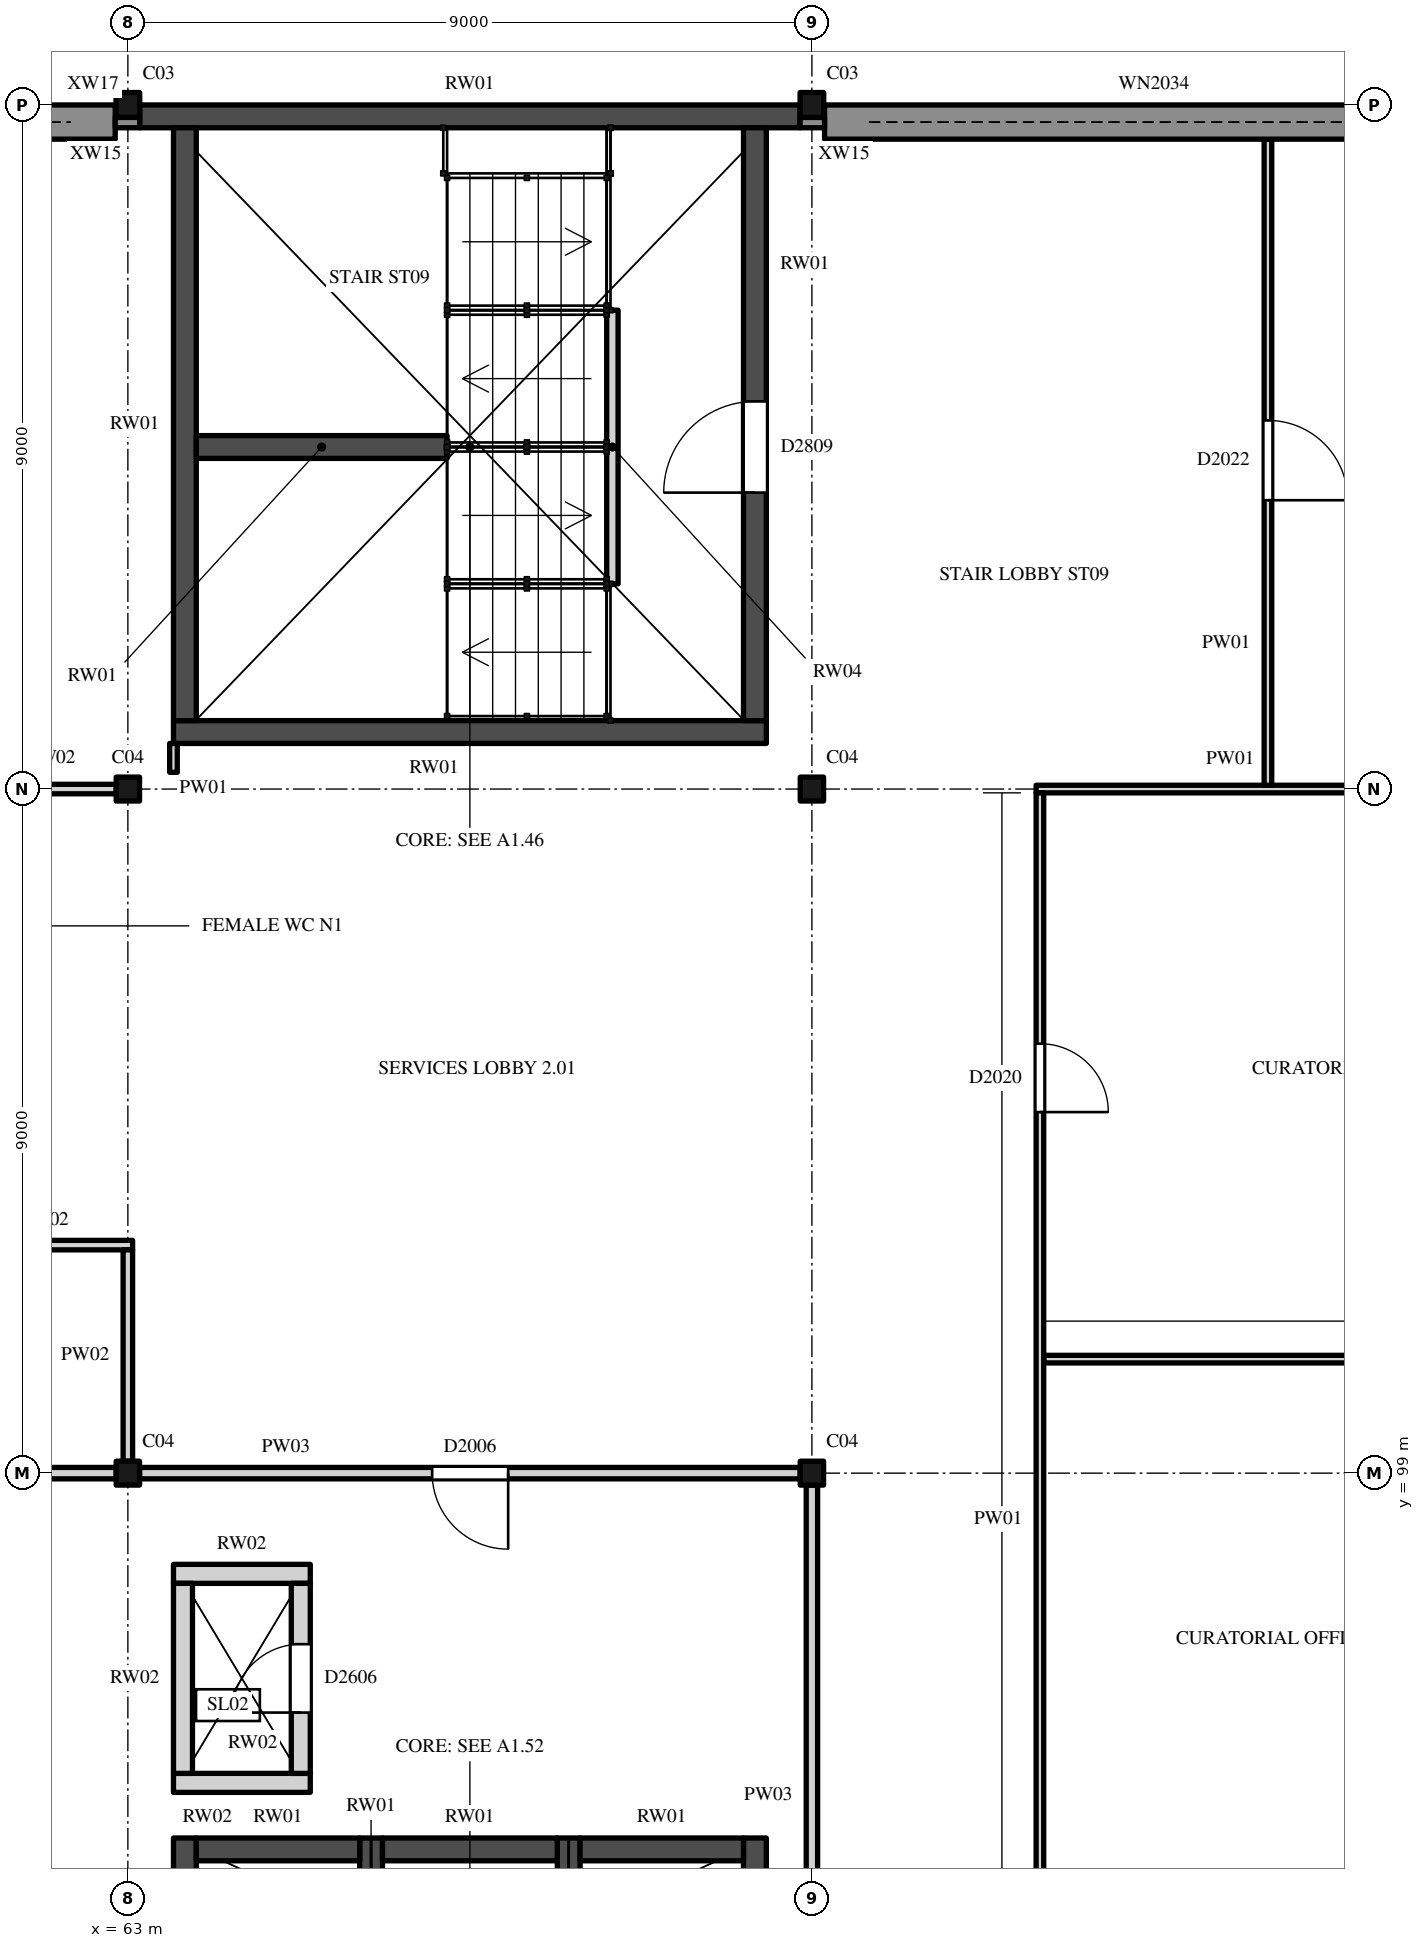
"""IFC4 building model, lengths in metres.
Left out: names, types, materials, properties, quantities, classifications, styles, units other than length and angle.
Written with IfcOpenShell. Run it as: python <this file> out.ifc"""

import sys

from ifc_helpers import new_model, si_unit, direction, frame, frame_2d, origin, origin_2d, place, context, subcontext, project, spatial, rectangle, i_section, extrude, element, fill, save


model = new_model("IFC4")
c1 = context("Model", 3, precision=1e-05, world=origin(), true_north=direction((0.0, 1.0)))
c2 = subcontext(c1, "Body", "Model", "MODEL_VIEW")
j1 = project(units=[si_unit("LENGTHUNIT", "METRE"), si_unit("PLANEANGLEUNIT", "RADIAN")], contexts=[c1])
p1 = place(None, origin())
s1 = spatial("IfcSite", under=j1, at=p1, CompositionType="ELEMENT")
p2 = place(p1, origin())
s2 = spatial("IfcBuilding", under=s1, at=p2, CompositionType="ELEMENT")
p3 = place(p2, frame((0.0, 0.0, 11.0)))
s3 = spatial("IfcBuildingStorey", under=s2, at=p3, CompositionType="ELEMENT", Elevation=11.0)
for number, where, z_axis, x_axis in (
    (1, (63.0, 99.0, 0.0), (0.0, 0.0, 1.0), (1.0, 0.0, 0.0)),
    (2, (72.0, 99.0, 0.0), (0.0, 0.0, 1.0), (1.0, 0.0, 0.0)),
    (3, (63.0, 108.0, 0.0), (0.0, 0.0, 1.0), (1.0, 0.0, 0.0)),
    (4, (72.0, 108.0, 0.0), (0.0, 0.0, 1.0), (1.0, 0.0, 0.0)),
):
    element("IfcColumn", number, at=place(p3, frame(where, z_axis=z_axis, x_axis=x_axis)), inside=s3, PredefinedType="COLUMN", context=c2, shape_type="SweptSolid", body=[
        extrude(i_section(OverallWidth=0.307, OverallDepth=0.315, WebThickness=0.012, FlangeThickness=0.019, FilletRadius=0.017, at=origin_2d()), origin(), (0.0, 0.0, 1.0), 5.0),
    ])
for number, where, z_axis, x_axis in (
    (5, (63.0, 117.0, 0.0), (0.0, 0.0, 1.0), (1.0, 0.0, 0.0)),
    (6, (72.0, 117.0, 0.0), (0.0, 0.0, 1.0), (1.0, 0.0, 0.0)),
):
    element("IfcColumn", number, at=place(p3, frame(where, z_axis=z_axis, x_axis=x_axis)), inside=s3, PredefinedType="COLUMN", context=c2, shape_type="SweptSolid", body=[
        extrude(i_section(OverallWidth=0.311, OverallDepth=0.327, WebThickness=0.016, FlangeThickness=0.025, FilletRadius=0.017, at=origin_2d()), origin(), (0.0, 0.0, 1.0), 5.0),
    ])
p4 = place(p3, frame((63.6, 108.75, 0.0), z_axis=(0.0, 0.0, 1.0), x_axis=(1.0, 0.0, 0.0)))
e7 = element("IfcWall", 7, at=p4, inside=s3, PredefinedType="SHEAR", context=c2, shape_type="SweptSolid", body=[
    extrude(rectangle(XDim=7.8, YDim=0.3, at=frame_2d((3.9, 0.0))), origin(), (0.0, 0.0, 1.0), 5.0),
])
p5 = place(p3, frame((63.156, 116.85, 0.0), z_axis=(0.0, 0.0, 1.0), x_axis=(1.0, 0.0, 0.0)))
e8 = element("IfcWall", 8, at=p5, inside=s3, PredefinedType="SHEAR", context=c2, shape_type="SweptSolid", body=[
    extrude(rectangle(XDim=8.689, YDim=0.3, at=frame_2d((4.344, 0.0))), origin(), (0.0, 0.0, 1.0), 5.0),
])
p6 = place(p3, frame((63.75, 108.9, 0.0), z_axis=(0.0, 0.0, 1.0), x_axis=(0.0, 1.0, 0.0)))
e9 = element("IfcWall", 9, at=p6, inside=s3, PredefinedType="SHEAR", context=c2, shape_type="SweptSolid", body=[
    extrude(rectangle(XDim=7.8, YDim=0.3, at=frame_2d((3.9, 0.0))), origin(), (0.0, 0.0, 1.0), 5.0),
])
p7 = place(p3, frame((71.25, 108.9, 0.0), z_axis=(0.0, 0.0, 1.0), x_axis=(0.0, 1.0, 0.0)))
e10 = element("IfcWall", 10, at=p7, inside=s3, PredefinedType="SHEAR", context=c2, shape_type="SweptSolid", body=[
    extrude(rectangle(XDim=7.8, YDim=0.3, at=frame_2d((3.9, 0.0))), origin(), (0.0, 0.0, 1.0), 5.0),
])
p8 = place(p7, frame((3.0, 0.0, 0.0)))
e11 = element("IfcOpeningElement", 11, at=p8, cuts=e10, PredefinedType="OPENING", context=c2, shape_type="SweptSolid", body=[
    extrude(rectangle(XDim=1.2, YDim=2.1, at=frame_2d((0.6, 1.05))), frame((0.0, 0.16, 0.0), z_axis=(0.0, -1.0, 0.0), x_axis=(1.0, 0.0, 0.0)), (0.0, 0.0, 1.0), 0.32),
])
p9 = place(p3, frame((67.2, 112.5, 0.0), z_axis=(0.0, 0.0, 1.0), x_axis=(-1.0, 0.0, 0.0)))
e12 = element("IfcWall", 12, at=p9, inside=s3, PredefinedType="SHEAR", context=c2, shape_type="SweptSolid", body=[
    extrude(rectangle(XDim=3.3, YDim=0.3, at=frame_2d((1.65, 0.0))), origin(), (0.0, 0.0, 1.0), 5.0),
])
p10 = place(p3, frame((69.375, 110.7, 0.0), z_axis=(0.0, 0.0, 1.0), x_axis=(0.0, 1.0, 0.0)))
e13 = element("IfcWall", 13, at=p10, inside=s3, PredefinedType="STANDARD", context=c2, shape_type="SweptSolid", body=[
    extrude(rectangle(XDim=3.6, YDim=0.15, at=frame_2d((1.8, 0.0))), origin(), (0.0, 0.0, 1.0), 2.3),
])
for number, where, z_axis, x_axis in (
    (14, (63.75, 90.6, 0.0), (0.0, 0.0, 1.0), (0.0, 1.0, 0.0)),
    (15, (66.2, 90.6, 0.0), (0.0, 0.0, 1.0), (0.0, 1.0, 0.0)),
    (16, (68.8, 90.6, 0.0), (0.0, 0.0, 1.0), (0.0, 1.0, 0.0)),
    (17, (71.25, 90.6, 0.0), (0.0, 0.0, 1.0), (0.0, 1.0, 0.0)),
):
    element("IfcWall", number, at=place(p3, frame(where, z_axis=z_axis, x_axis=x_axis)), inside=s3, PredefinedType="SHEAR", context=c2, shape_type="SweptSolid", body=[
        extrude(rectangle(XDim=3.6, YDim=0.3, at=frame_2d((1.8, 0.0))), origin(), (0.0, 0.0, 1.0), 5.0),
    ])
p11 = place(p3, frame((63.9, 94.05, 0.0), z_axis=(0.0, 0.0, 1.0), x_axis=(1.0, 0.0, 0.0)))
e18 = element("IfcWall", 18, at=p11, inside=s3, PredefinedType="SHEAR", context=c2, shape_type="SweptSolid", body=[
    extrude(rectangle(XDim=2.15, YDim=0.3, at=frame_2d((1.075, 0.0))), origin(), (0.0, 0.0, 1.0), 5.0),
])
p12 = place(p3, frame((66.35, 94.05, 0.0), z_axis=(0.0, 0.0, 1.0), x_axis=(1.0, 0.0, 0.0)))
e19 = element("IfcWall", 19, at=p12, inside=s3, PredefinedType="SHEAR", context=c2, shape_type="SweptSolid", body=[
    extrude(rectangle(XDim=2.3, YDim=0.3, at=frame_2d((1.15, 0.0))), origin(), (0.0, 0.0, 1.0), 5.0),
])
p13 = place(p3, frame((68.95, 94.05, 0.0), z_axis=(0.0, 0.0, 1.0), x_axis=(1.0, 0.0, 0.0)))
e20 = element("IfcWall", 20, at=p13, inside=s3, PredefinedType="SHEAR", context=c2, shape_type="SweptSolid", body=[
    extrude(rectangle(XDim=2.15, YDim=0.3, at=frame_2d((1.075, 0.0))), origin(), (0.0, 0.0, 1.0), 5.0),
])
for number, where, z_axis, x_axis in (
    (21, (63.6, 94.925, 0.0), (0.0, 0.0, 1.0), (1.0, 0.0, 0.0)),
    (22, (63.6, 97.675, 0.0), (0.0, 0.0, 1.0), (1.0, 0.0, 0.0)),
):
    element("IfcWall", number, at=place(p3, frame(where, z_axis=z_axis, x_axis=x_axis)), inside=s3, PredefinedType="STANDARD", context=c2, shape_type="SweptSolid", body=[
        extrude(rectangle(XDim=1.8, YDim=0.25, at=frame_2d((0.9, 0.0))), origin(), (0.0, 0.0, 1.0), 5.0),
    ])
p14 = place(p3, frame((63.725, 95.05, 0.0), z_axis=(0.0, 0.0, 1.0), x_axis=(0.0, 1.0, 0.0)))
e23 = element("IfcWall", 23, at=p14, inside=s3, PredefinedType="STANDARD", context=c2, shape_type="SweptSolid", body=[
    extrude(rectangle(XDim=2.5, YDim=0.25, at=frame_2d((1.25, 0.0))), origin(), (0.0, 0.0, 1.0), 5.0),
])
p15 = place(p3, frame((65.275, 95.05, 0.0), z_axis=(0.0, 0.0, 1.0), x_axis=(0.0, 1.0, 0.0)))
e24 = element("IfcWall", 24, at=p15, inside=s3, PredefinedType="STANDARD", context=c2, shape_type="SweptSolid", body=[
    extrude(rectangle(XDim=2.5, YDim=0.25, at=frame_2d((1.25, 0.0))), origin(), (0.0, 0.0, 1.0), 5.0),
])
p16 = place(p15, frame((0.8, 0.0, 0.0)))
e25 = element("IfcOpeningElement", 25, at=p16, cuts=e24, PredefinedType="OPENING", context=c2, shape_type="SweptSolid", body=[
    extrude(rectangle(XDim=0.9, YDim=2.1, at=frame_2d((0.45, 1.05))), frame((0.0, 0.135, 0.0), z_axis=(0.0, -1.0, 0.0), x_axis=(1.0, 0.0, 0.0)), (0.0, 0.0, 1.0), 0.27),
])
p17 = place(p3, frame((54.156, 116.775, 0.0), z_axis=(0.0, 0.0, 1.0), x_axis=(1.0, 0.0, 0.0)))
e26 = element("IfcWall", 26, at=p17, inside=s3, PredefinedType="SOLIDWALL", context=c2, shape_type="SweptSolid", body=[
    extrude(rectangle(XDim=8.678, YDim=0.45, at=frame_2d((4.339, 0.0))), origin(), (0.0, 0.0, 1.0), 4.469),
])
p18 = place(p17, frame((0.594, 0.0, 1.6)))
e27 = element("IfcOpeningElement", 27, at=p18, cuts=e26, PredefinedType="OPENING", context=c2, shape_type="SweptSolid", body=[
    extrude(rectangle(XDim=7.5, YDim=1.2, at=frame_2d((3.75, 0.6))), frame((0.0, 0.235, 0.0), z_axis=(0.0, -1.0, 0.0), x_axis=(1.0, 0.0, 0.0)), (0.0, 0.0, 1.0), 0.47),
])
p19 = place(p3, frame((72.167, 116.775, 0.0), z_axis=(0.0, 0.0, 1.0), x_axis=(1.0, 0.0, 0.0)))
e28 = element("IfcWall", 28, at=p19, inside=s3, PredefinedType="SOLIDWALL", context=c2, shape_type="SweptSolid", body=[
    extrude(rectangle(XDim=8.673, YDim=0.45, at=frame_2d((4.336, 0.0))), origin(), (0.0, 0.0, 1.0), 4.469),
])
p20 = place(p19, frame((0.583, 0.0, 1.6)))
e29 = element("IfcOpeningElement", 29, at=p20, cuts=e28, PredefinedType="OPENING", context=c2, shape_type="SweptSolid", body=[
    extrude(rectangle(XDim=7.5, YDim=1.2, at=frame_2d((3.75, 0.6))), frame((0.0, 0.235, 0.0), z_axis=(0.0, -1.0, 0.0), x_axis=(1.0, 0.0, 0.0)), (0.0, 0.0, 1.0), 0.47),
])
for number, where, z_axis, x_axis in (
    (30, (62.833, 116.768, 0.0), (0.0, 0.0, 1.0), (1.0, 0.0, 0.0)),
    (31, (71.844, 116.768, 0.0), (0.0, 0.0, 1.0), (1.0, 0.0, 0.0)),
):
    element("IfcWall", number, at=place(p3, frame(where, z_axis=z_axis, x_axis=x_axis)), inside=s3, PredefinedType="SOLIDWALL", context=c2, shape_type="SweptSolid", body=[
        extrude(rectangle(XDim=0.322, YDim=0.136, at=frame_2d((0.161, 0.0))), origin(), (0.0, 0.0, 1.0), 5.0),
    ])
p21 = place(p3, frame((54.45, 99.0, 0.0), z_axis=(0.0, 0.0, 1.0), x_axis=(1.0, 0.0, 0.0)))
e32 = element("IfcWall", 32, at=p21, inside=s3, PredefinedType="PARTITIONING", context=c2, shape_type="SweptSolid", body=[
    extrude(rectangle(XDim=8.396, YDim=0.15, at=frame_2d((4.198, 0.0))), origin(), (0.0, 0.0, 1.0), 4.469),
])
p22 = place(p3, frame((63.154, 99.0, 0.0), z_axis=(0.0, 0.0, 1.0), x_axis=(1.0, 0.0, 0.0)))
e33 = element("IfcWall", 33, at=p22, inside=s3, PredefinedType="PARTITIONING", context=c2, shape_type="SweptSolid", body=[
    extrude(rectangle(XDim=8.693, YDim=0.15, at=frame_2d((4.346, 0.0))), origin(), (0.0, 0.0, 1.0), 4.469),
])
p23 = place(p22, frame((3.85, 0.0, 0.0)))
e34 = element("IfcOpeningElement", 34, at=p23, cuts=e33, PredefinedType="OPENING", context=c2, shape_type="SweptSolid", body=[
    extrude(rectangle(XDim=1.0, YDim=2.4, at=frame_2d((0.5, 1.2))), frame((0.0, 0.085, 0.0), z_axis=(0.0, -1.0, 0.0), x_axis=(1.0, 0.0, 0.0)), (0.0, 0.0, 1.0), 0.17),
])
p24 = place(p3, frame((75.05, 100.5, 0.0), z_axis=(0.0, 0.0, 1.0), x_axis=(1.0, 0.0, 0.0)))
e35 = element("IfcWall", 35, at=p24, inside=s3, PredefinedType="PARTITIONING", context=c2, shape_type="SweptSolid", body=[
    extrude(rectangle(XDim=20.9, YDim=0.1, at=frame_2d((10.45, 0.0))), origin(), (0.0, 0.0, 1.0), 4.825),
])
p25 = place(p3, frame((54.45, 102.0, 0.0), z_axis=(0.0, 0.0, 1.0), x_axis=(1.0, 0.0, 0.0)))
e36 = element("IfcWall", 36, at=p25, inside=s3, PredefinedType="PARTITIONING", context=c2, shape_type="SweptSolid", body=[
    extrude(rectangle(XDim=8.613, YDim=0.125, at=frame_2d((4.306, 0.0))), origin(), (0.0, 0.0, 1.0), 4.469),
])
p26 = place(p25, frame((1.15, 0.0, 0.0)))
e37 = element("IfcOpeningElement", 37, at=p26, cuts=e36, PredefinedType="OPENING", context=c2, shape_type="SweptSolid", body=[
    extrude(rectangle(XDim=0.9, YDim=2.1, at=frame_2d((0.45, 1.05))), frame((0.0, 0.073, 0.0), z_axis=(0.0, -1.0, 0.0), x_axis=(1.0, 0.0, 0.0)), (0.0, 0.0, 1.0), 0.145),
])
p27 = place(p25, frame((5.4, 0.0, 0.0)))
e38 = element("IfcOpeningElement", 38, at=p27, cuts=e36, PredefinedType="OPENING", context=c2, shape_type="SweptSolid", body=[
    extrude(rectangle(XDim=0.9, YDim=2.1, at=frame_2d((0.45, 1.05))), frame((0.0, 0.073, 0.0), z_axis=(0.0, -1.0, 0.0), x_axis=(1.0, 0.0, 0.0)), (0.0, 0.0, 1.0), 0.145),
])
p28 = place(p3, frame((54.45, 108.0, 0.0), z_axis=(0.0, 0.0, 1.0), x_axis=(1.0, 0.0, 0.0)))
e39 = element("IfcWall", 39, at=p28, inside=s3, PredefinedType="PARTITIONING", context=c2, shape_type="SweptSolid", body=[
    extrude(rectangle(XDim=8.396, YDim=0.125, at=frame_2d((4.198, 0.0))), origin(), (0.0, 0.0, 1.0), 4.469),
])
p29 = place(p28, frame((6.5, 0.0, 0.0)))
e40 = element("IfcOpeningElement", 40, at=p29, cuts=e39, PredefinedType="OPENING", context=c2, shape_type="SweptSolid", body=[
    extrude(rectangle(XDim=1.0, YDim=2.1, at=frame_2d((0.5, 1.05))), frame((0.0, 0.073, 0.0), z_axis=(0.0, -1.0, 0.0), x_axis=(1.0, 0.0, 0.0)), (0.0, 0.0, 1.0), 0.145),
])
p30 = place(p3, frame((74.95, 108.0, 0.0), z_axis=(0.0, 0.0, 1.0), x_axis=(1.0, 0.0, 0.0)))
e41 = element("IfcWall", 41, at=p30, inside=s3, PredefinedType="PARTITIONING", context=c2, shape_type="SweptSolid", body=[
    extrude(rectangle(XDim=5.896, YDim=0.1, at=frame_2d((2.948, 0.0))), origin(), (0.0, 0.0, 1.0), 4.469),
])
p31 = place(p3, frame((63.0, 99.157, 0.0), z_axis=(0.0, 0.0, 1.0), x_axis=(0.0, 1.0, 0.0)))
e42 = element("IfcWall", 42, at=p31, inside=s3, PredefinedType="PARTITIONING", context=c2, shape_type="SweptSolid", body=[
    extrude(rectangle(XDim=2.78, YDim=0.125, at=frame_2d((1.39, 0.0))), origin(), (0.0, 0.0, 1.0), 4.371),
])
p32 = place(p3, frame((63.6, 108.22, 0.0), z_axis=(0.0, 0.0, 1.0), x_axis=(0.0, 1.0, 0.0)))
e43 = element("IfcWall", 43, at=p32, inside=s3, PredefinedType="PARTITIONING", context=c2, shape_type="SweptSolid", body=[
    extrude(rectangle(XDim=0.38, YDim=0.1, at=frame_2d((0.19, 0.0))), origin(), (0.0, 0.0, 1.0), 4.825),
])
p33 = place(p3, frame((72.0, 90.675, 0.0), z_axis=(0.0, 0.0, 1.0), x_axis=(0.0, 1.0, 0.0)))
e44 = element("IfcWall", 44, at=p33, inside=s3, PredefinedType="PARTITIONING", context=c2, shape_type="SweptSolid", body=[
    extrude(rectangle(XDim=8.168, YDim=0.15, at=frame_2d((4.084, 0.0))), origin(), (0.0, 0.0, 1.0), 4.371),
])
p34 = place(p3, frame((75.0, 93.05, 0.0), z_axis=(0.0, 0.0, 1.0), x_axis=(0.0, 1.0, 0.0)))
e45 = element("IfcWall", 45, at=p34, inside=s3, PredefinedType="PARTITIONING", context=c2, shape_type="SweptSolid", body=[
    extrude(rectangle(XDim=14.9, YDim=0.1, at=frame_2d((7.45, 0.0))), origin(), (0.0, 0.0, 1.0), 4.825),
])
p35 = place(p34, frame((10.7, 0.0, 0.0)))
e46 = element("IfcOpeningElement", 46, at=p35, cuts=e45, PredefinedType="OPENING", context=c2, shape_type="SweptSolid", body=[
    extrude(rectangle(XDim=0.9, YDim=2.1, at=frame_2d((0.45, 1.05))), frame((0.0, 0.06, 0.0), z_axis=(0.0, -1.0, 0.0), x_axis=(1.0, 0.0, 0.0)), (0.0, 0.0, 1.0), 0.12),
])
p36 = place(p3, frame((78.0, 108.05, 0.0), z_axis=(0.0, 0.0, 1.0), x_axis=(0.0, 1.0, 0.0)))
e47 = element("IfcWall", 47, at=p36, inside=s3, PredefinedType="PARTITIONING", context=c2, shape_type="SweptSolid", body=[
    extrude(rectangle(XDim=8.5, YDim=0.1, at=frame_2d((4.25, 0.0))), origin(), (0.0, 0.0, 1.0), 4.825),
])
p37 = place(p36, frame((3.75, 0.0, 0.0)))
e48 = element("IfcOpeningElement", 48, at=p37, cuts=e47, PredefinedType="OPENING", context=c2, shape_type="SweptSolid", body=[
    extrude(rectangle(XDim=1.05, YDim=2.1, at=frame_2d((0.525, 1.05))), frame((0.0, 0.06, 0.0), z_axis=(0.0, -1.0, 0.0), x_axis=(1.0, 0.0, 0.0)), (0.0, 0.0, 1.0), 0.12),
])
p38 = place(p8, origin())
e49 = element("IfcDoor", 49, at=p38, inside=s3, OperationType="SINGLE_SWING_RIGHT", PredefinedType="DOOR", context=c2, shape_type="SweptSolid", body=[
    extrude(rectangle(XDim=1.2, YDim=2.1, at=frame_2d((0.6, 1.05))), frame((0.0, 0.025, 0.0), z_axis=(0.0, -1.0, 0.0), x_axis=(1.0, 0.0, 0.0)), (0.0, 0.0, 1.0), 0.05),
])
fill(e11, e49)
p39 = place(p16, origin())
e50 = element("IfcDoor", 50, at=p39, inside=s3, OperationType="SINGLE_SWING_RIGHT", PredefinedType="DOOR", context=c2, shape_type="SweptSolid", body=[
    extrude(rectangle(XDim=0.9, YDim=2.1, at=frame_2d((0.45, 1.05))), frame((0.0, 0.025, 0.0), z_axis=(0.0, -1.0, 0.0), x_axis=(1.0, 0.0, 0.0)), (0.0, 0.0, 1.0), 0.05),
])
fill(e25, e50)
p40 = place(p18, origin())
e51 = element("IfcWindow", 51, at=p40, inside=s3, PartitioningType="SINGLE_PANEL", PredefinedType="WINDOW", context=c2, shape_type="SweptSolid", body=[
    extrude(rectangle(XDim=7.5, YDim=1.2, at=frame_2d((3.75, 0.6))), frame((0.0, 0.03, 0.0), z_axis=(0.0, -1.0, 0.0), x_axis=(1.0, 0.0, 0.0)), (0.0, 0.0, 1.0), 0.06),
])
fill(e27, e51)
p41 = place(p20, origin())
e52 = element("IfcWindow", 52, at=p41, inside=s3, PartitioningType="SINGLE_PANEL", PredefinedType="WINDOW", context=c2, shape_type="SweptSolid", body=[
    extrude(rectangle(XDim=7.5, YDim=1.2, at=frame_2d((3.75, 0.6))), frame((0.0, 0.03, 0.0), z_axis=(0.0, -1.0, 0.0), x_axis=(1.0, 0.0, 0.0)), (0.0, 0.0, 1.0), 0.06),
])
fill(e29, e52)
p42 = place(p23, origin())
e53 = element("IfcDoor", 53, at=p42, inside=s3, OperationType="SINGLE_SWING_RIGHT", PredefinedType="DOOR", context=c2, shape_type="SweptSolid", body=[
    extrude(rectangle(XDim=1.0, YDim=2.4, at=frame_2d((0.5, 1.2))), frame((0.0, 0.025, 0.0), z_axis=(0.0, -1.0, 0.0), x_axis=(1.0, 0.0, 0.0)), (0.0, 0.0, 1.0), 0.05),
])
fill(e34, e53)
p43 = place(p35, origin())
e54 = element("IfcDoor", 54, at=p43, inside=s3, OperationType="SINGLE_SWING_LEFT", PredefinedType="DOOR", context=c2, shape_type="SweptSolid", body=[
    extrude(rectangle(XDim=0.9, YDim=2.1, at=frame_2d((0.45, 1.05))), frame((0.0, 0.025, 0.0), z_axis=(0.0, -1.0, 0.0), x_axis=(1.0, 0.0, 0.0)), (0.0, 0.0, 1.0), 0.05),
])
fill(e46, e54)
p44 = place(p37, origin())
e55 = element("IfcDoor", 55, at=p44, inside=s3, OperationType="SINGLE_SWING_LEFT", PredefinedType="DOOR", context=c2, shape_type="SweptSolid", body=[
    extrude(rectangle(XDim=1.05, YDim=2.1, at=frame_2d((0.525, 1.05))), frame((0.0, 0.025, 0.0), z_axis=(0.0, -1.0, 0.0), x_axis=(1.0, 0.0, 0.0)), (0.0, 0.0, 1.0), 0.05),
])
fill(e48, e55)
save(model, sys.argv[1])
